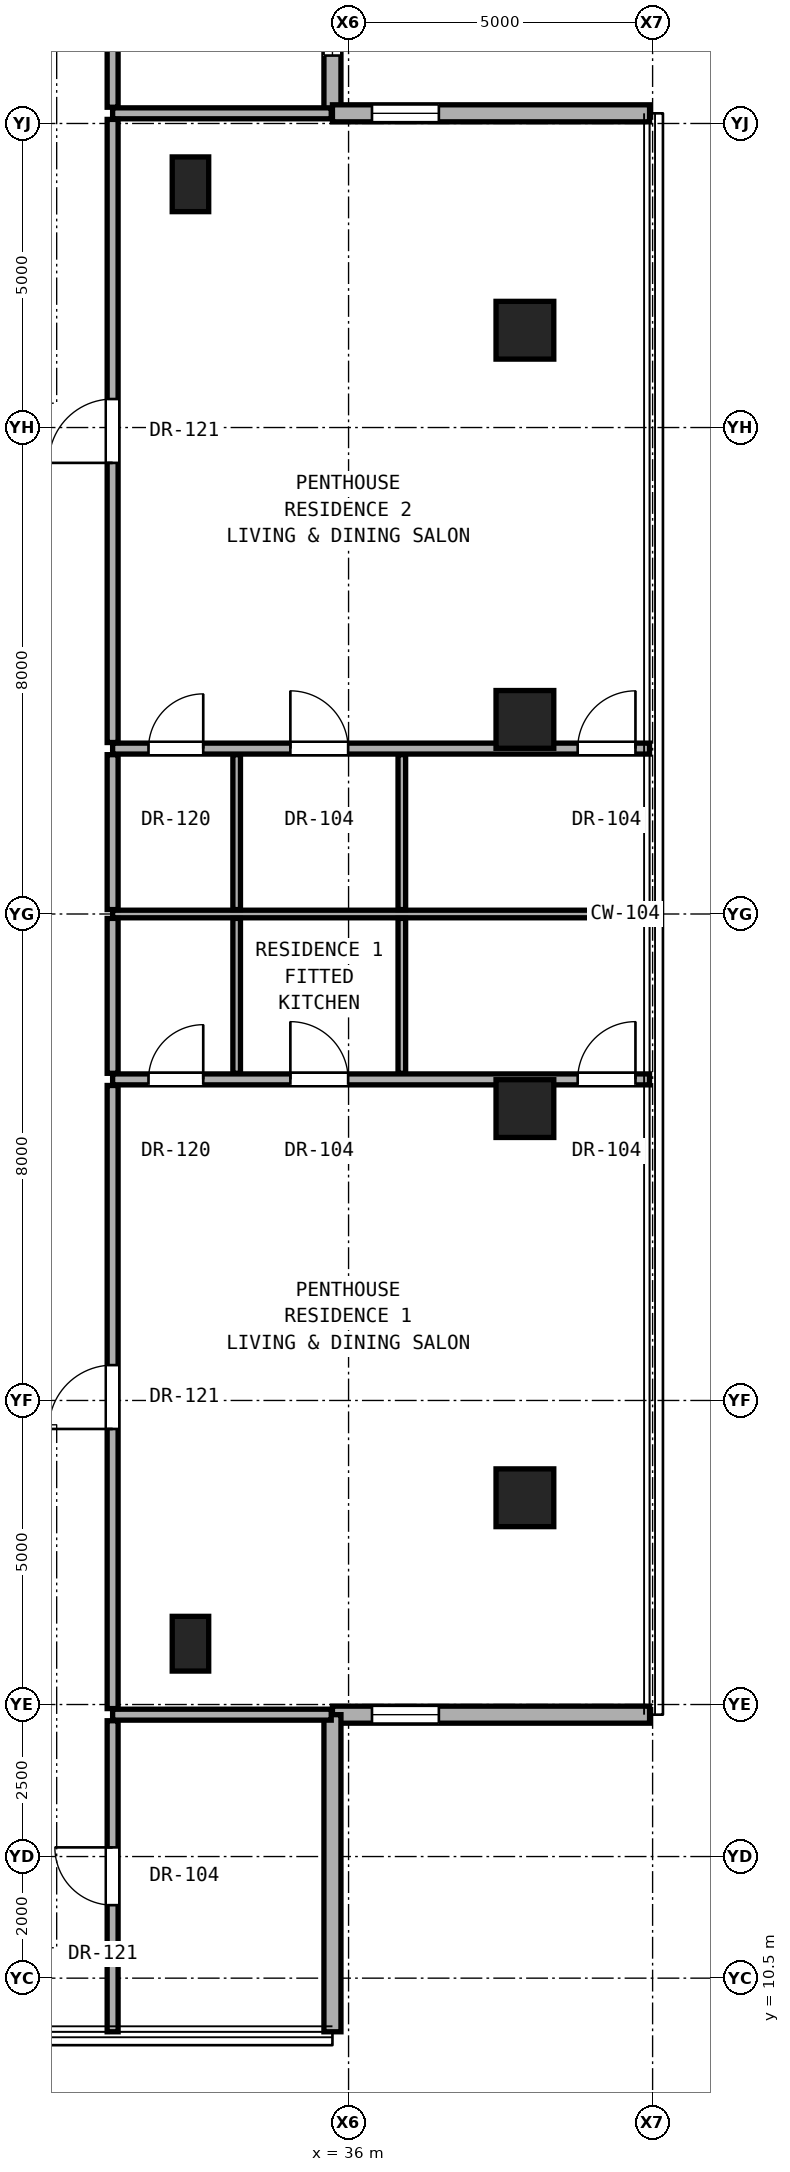
"""IFC4 building model, lengths in metres.
Left out: names, types, materials, properties, quantities, classifications, styles, units other than length and angle.
Written with IfcOpenShell. Run it as: python <this file> out.ifc"""

import sys

from ifc_helpers import new_model, si_unit, direction, frame, frame_2d, origin, origin_2d, place, context, subcontext, project, spatial, rectangle, hollow_rectangle, extrude, element, fill, save


model = new_model("IFC4")
c1 = context("Model", 3, precision=1e-05, world=origin(), true_north=direction((0.0, 1.0)))
c2 = subcontext(c1, "Body", "Model", "MODEL_VIEW")
j1 = project(units=[si_unit("LENGTHUNIT", "METRE"), si_unit("PLANEANGLEUNIT", "RADIAN")], contexts=[c1])
p1 = place(None, origin())
s1 = spatial("IfcSite", under=j1, at=p1, CompositionType="ELEMENT")
p2 = place(p1, origin())
s2 = spatial("IfcBuilding", under=s1, at=p2, CompositionType="ELEMENT")
p3 = place(p2, frame((0.0, 0.0, 196.65)))
s3 = spatial("IfcBuildingStorey", under=s2, at=p3, CompositionType="ELEMENT", Elevation=196.65)
for number, where, z_axis, x_axis in (
    (1, (38.9, 18.4, 0.0), (0.0, 0.0, 1.0), (1.0, 0.0, 0.0)),
    (2, (38.9, 24.8, 0.0), (0.0, 0.0, 1.0), (1.0, 0.0, 0.0)),
    (3, (38.9, 31.2, 0.0), (0.0, 0.0, 1.0), (1.0, 0.0, 0.0)),
    (4, (38.9, 37.6, 0.0), (0.0, 0.0, 1.0), (1.0, 0.0, 0.0)),
):
    element("IfcColumn", number, at=place(p3, frame(where, z_axis=z_axis, x_axis=x_axis)), inside=s3, PredefinedType="COLUMN", context=c2, shape_type="SweptSolid", body=[
        extrude(hollow_rectangle(XDim=0.95, YDim=0.95, WallThickness=0.05, at=origin_2d()), origin(), (0.0, 0.0, 1.0), 3.25),
    ])
for number, where, z_axis, x_axis in (
    (5, (33.4, 16.0, 0.0), (0.0, 0.0, 1.0), (1.0, 0.0, 0.0)),
    (6, (33.4, 40.0, 0.0), (0.0, 0.0, 1.0), (1.0, 0.0, 0.0)),
):
    element("IfcColumn", number, at=place(p3, frame(where, z_axis=z_axis, x_axis=x_axis)), inside=s3, PredefinedType="PILASTER", context=c2, shape_type="SweptSolid", body=[
        extrude(rectangle(XDim=0.6, YDim=0.9, at=origin_2d()), origin(), (0.0, 0.0, 1.0), 3.25),
    ])
p4 = place(p3, frame((35.735, 41.167, 0.0), z_axis=(0.0, 0.0, 1.0), x_axis=(0.0, 1.0, 0.0)))
e7 = element("IfcWall", 7, at=p4, inside=s3, PredefinedType="SOLIDWALL", context=c2, shape_type="SweptSolid", body=[
    extrude(rectangle(XDim=5.215, YDim=0.28, at=frame_2d((2.607, 0.0))), origin(), (0.0, 0.0, 1.0), 3.03),
])
p5 = place(p4, frame((0.95, 0.0, 0.85)))
e8 = element("IfcOpeningElement", 8, at=p5, cuts=e7, PredefinedType="OPENING", context=c2, shape_type="SweptSolid", body=[
    extrude(rectangle(XDim=1.1, YDim=2.0, at=frame_2d((0.55, 1.0))), frame((0.0, 0.15, 0.0), z_axis=(0.0, -1.0, 0.0), x_axis=(1.0, 0.0, 0.0)), (0.0, 0.0, 1.0), 0.3),
])
p6 = place(p3, frame((35.735, 14.833, 0.0), z_axis=(0.0, 0.0, 1.0), x_axis=(1.0, 0.0, 0.0)))
e9 = element("IfcWall", 9, at=p6, inside=s3, PredefinedType="SOLIDWALL", context=c2, shape_type="SweptSolid", body=[
    extrude(rectangle(XDim=5.215, YDim=0.28, at=frame_2d((2.607, 0.0))), origin(), (0.0, 0.0, 1.0), 3.03),
])
p7 = place(p6, frame((0.65, 0.0, 0.85)))
e10 = element("IfcOpeningElement", 10, at=p7, cuts=e9, PredefinedType="OPENING", context=c2, shape_type="SweptSolid", body=[
    extrude(rectangle(XDim=1.1, YDim=2.0, at=frame_2d((0.55, 1.0))), frame((0.0, 0.15, 0.0), z_axis=(0.0, -1.0, 0.0), x_axis=(1.0, 0.0, 0.0)), (0.0, 0.0, 1.0), 0.3),
])
p8 = place(p3, frame((35.735, 9.618, 0.0), z_axis=(0.0, 0.0, 1.0), x_axis=(0.0, 1.0, 0.0)))
e11 = element("IfcWall", 11, at=p8, inside=s3, PredefinedType="SOLIDWALL", context=c2, shape_type="SweptSolid", body=[
    extrude(rectangle(XDim=5.215, YDim=0.28, at=frame_2d((2.607, 0.0))), origin(), (0.0, 0.0, 1.0), 3.03),
])
p9 = place(p3, frame((40.95, 41.167, 0.0), z_axis=(0.0, 0.0, 1.0), x_axis=(-1.0, 0.0, 0.0)))
e12 = element("IfcWall", 12, at=p9, inside=s3, PredefinedType="SOLIDWALL", context=c2, shape_type="SweptSolid", body=[
    extrude(rectangle(XDim=5.215, YDim=0.28, at=frame_2d((2.607, 0.0))), origin(), (0.0, 0.0, 1.0), 3.03),
])
p10 = place(p9, frame((3.465, 0.0, 0.85)))
e13 = element("IfcOpeningElement", 13, at=p10, cuts=e12, PredefinedType="OPENING", context=c2, shape_type="SweptSolid", body=[
    extrude(rectangle(XDim=1.1, YDim=2.0, at=frame_2d((0.55, 1.0))), frame((0.0, 0.15, 0.0), z_axis=(0.0, -1.0, 0.0), x_axis=(1.0, 0.0, 0.0)), (0.0, 0.0, 1.0), 0.3),
])
p11 = place(p3, frame((32.12, 14.833, 0.0), z_axis=(0.0, 0.0, 1.0), x_axis=(1.0, 0.0, 0.0)))
e14 = element("IfcWall", 14, at=p11, inside=s3, PredefinedType="PARTITIONING", context=c2, shape_type="SweptSolid", body=[
    extrude(rectangle(XDim=3.595, YDim=0.18, at=frame_2d((1.797, 0.0))), origin(), (0.0, 0.0, 1.0), 3.05),
])
p12 = place(p3, frame((32.12, 25.28, 0.0), z_axis=(0.0, 0.0, 1.0), x_axis=(1.0, 0.0, 0.0)))
e15 = element("IfcWall", 15, at=p12, inside=s3, PredefinedType="PARTITIONING", context=c2, shape_type="SweptSolid", body=[
    extrude(rectangle(XDim=8.83, YDim=0.18, at=frame_2d((4.415, 0.0))), origin(), (0.0, 0.0, 1.0), 2.269),
])
p13 = place(p12, frame((7.648, 0.0, 0.0)))
e16 = element("IfcOpeningElement", 16, at=p13, cuts=e15, PredefinedType="OPENING", context=c2, shape_type="SweptSolid", body=[
    extrude(rectangle(XDim=0.95, YDim=2.15, at=frame_2d((0.475, 1.075))), frame((0.0, 0.1, 0.0), z_axis=(0.0, -1.0, 0.0), x_axis=(1.0, 0.0, 0.0)), (0.0, 0.0, 1.0), 0.2),
])
p14 = place(p12, frame((2.923, 0.0, 0.0)))
e17 = element("IfcOpeningElement", 17, at=p14, cuts=e15, PredefinedType="OPENING", context=c2, shape_type="SweptSolid", body=[
    extrude(rectangle(XDim=0.95, YDim=2.15, at=frame_2d((0.475, 1.075))), frame((0.0, 0.1, 0.0), z_axis=(0.0, -1.0, 0.0), x_axis=(1.0, 0.0, 0.0)), (0.0, 0.0, 1.0), 0.2),
])
p15 = place(p12, frame((0.59, 0.0, 0.0)))
e18 = element("IfcOpeningElement", 18, at=p15, cuts=e15, PredefinedType="OPENING", context=c2, shape_type="SweptSolid", body=[
    extrude(rectangle(XDim=0.9, YDim=2.1, at=frame_2d((0.45, 1.05))), frame((0.0, 0.1, 0.0), z_axis=(0.0, -1.0, 0.0), x_axis=(1.0, 0.0, 0.0)), (0.0, 0.0, 1.0), 0.2),
])
p16 = place(p3, frame((32.12, 28.0, 0.0), z_axis=(0.0, 0.0, 1.0), x_axis=(1.0, 0.0, 0.0)))
e19 = element("IfcWall", 19, at=p16, inside=s3, PredefinedType="PARTITIONING", context=c2, shape_type="SweptSolid", body=[
    extrude(rectangle(XDim=8.83, YDim=0.125, at=frame_2d((4.415, 0.0))), origin(), (0.0, 0.0, 1.0), 2.269),
])
p17 = place(p3, frame((32.12, 30.72, 0.0), z_axis=(0.0, 0.0, 1.0), x_axis=(1.0, 0.0, 0.0)))
e20 = element("IfcWall", 20, at=p17, inside=s3, PredefinedType="PARTITIONING", context=c2, shape_type="SweptSolid", body=[
    extrude(rectangle(XDim=8.83, YDim=0.18, at=frame_2d((4.415, 0.0))), origin(), (0.0, 0.0, 1.0), 2.269),
])
p18 = place(p17, frame((7.648, 0.0, 0.0)))
e21 = element("IfcOpeningElement", 21, at=p18, cuts=e20, PredefinedType="OPENING", context=c2, shape_type="SweptSolid", body=[
    extrude(rectangle(XDim=0.95, YDim=2.15, at=frame_2d((0.475, 1.075))), frame((0.0, 0.1, 0.0), z_axis=(0.0, -1.0, 0.0), x_axis=(1.0, 0.0, 0.0)), (0.0, 0.0, 1.0), 0.2),
])
p19 = place(p17, frame((2.923, 0.0, 0.0)))
e22 = element("IfcOpeningElement", 22, at=p19, cuts=e20, PredefinedType="OPENING", context=c2, shape_type="SweptSolid", body=[
    extrude(rectangle(XDim=0.95, YDim=2.15, at=frame_2d((0.475, 1.075))), frame((0.0, 0.1, 0.0), z_axis=(0.0, -1.0, 0.0), x_axis=(1.0, 0.0, 0.0)), (0.0, 0.0, 1.0), 0.2),
])
p20 = place(p17, frame((0.59, 0.0, 0.0)))
e23 = element("IfcOpeningElement", 23, at=p20, cuts=e20, PredefinedType="OPENING", context=c2, shape_type="SweptSolid", body=[
    extrude(rectangle(XDim=0.9, YDim=2.1, at=frame_2d((0.45, 1.05))), frame((0.0, 0.1, 0.0), z_axis=(0.0, -1.0, 0.0), x_axis=(1.0, 0.0, 0.0)), (0.0, 0.0, 1.0), 0.2),
])
p21 = place(p3, frame((32.12, 41.167, 0.0), z_axis=(0.0, 0.0, 1.0), x_axis=(1.0, 0.0, 0.0)))
e24 = element("IfcWall", 24, at=p21, inside=s3, PredefinedType="PARTITIONING", context=c2, shape_type="SweptSolid", body=[
    extrude(rectangle(XDim=3.595, YDim=0.18, at=frame_2d((1.797, 0.0))), origin(), (0.0, 0.0, 1.0), 3.05),
])
p22 = place(p3, frame((32.12, 9.618, 0.0), z_axis=(0.0, 0.0, 1.0), x_axis=(0.0, 1.0, 0.0)))
e25 = element("IfcWall", 25, at=p22, inside=s3, PredefinedType="PARTITIONING", context=c2, shape_type="SweptSolid", body=[
    extrude(rectangle(XDim=5.115, YDim=0.18, at=frame_2d((2.558, 0.0))), origin(), (0.0, 0.0, 1.0), 3.05),
])
p23 = place(p22, frame((2.083, 0.0, 0.0)))
e26 = element("IfcOpeningElement", 26, at=p23, cuts=e25, PredefinedType="OPENING", context=c2, shape_type="SweptSolid", body=[
    extrude(rectangle(XDim=0.95, YDim=2.15, at=frame_2d((0.475, 1.075))), frame((0.0, 0.1, 0.0), z_axis=(0.0, -1.0, 0.0), x_axis=(1.0, 0.0, 0.0)), (0.0, 0.0, 1.0), 0.2),
])
p24 = place(p3, frame((32.12, 14.933, 0.0), z_axis=(0.0, 0.0, 1.0), x_axis=(0.0, 1.0, 0.0)))
e27 = element("IfcWall", 27, at=p24, inside=s3, PredefinedType="PARTITIONING", context=c2, shape_type="SweptSolid", body=[
    extrude(rectangle(XDim=10.247, YDim=0.18, at=frame_2d((5.124, 0.0))), origin(), (0.0, 0.0, 1.0), 2.346),
])
p25 = place(p24, frame((4.598, 0.0, 0.0)))
e28 = element("IfcOpeningElement", 28, at=p25, cuts=e27, PredefinedType="OPENING", context=c2, shape_type="SweptSolid", body=[
    extrude(rectangle(XDim=1.05, YDim=2.2, at=frame_2d((0.525, 1.1))), frame((0.0, 0.1, 0.0), z_axis=(0.0, -1.0, 0.0), x_axis=(1.0, 0.0, 0.0)), (0.0, 0.0, 1.0), 0.2),
])
for number, where, z_axis, x_axis in (
    (29, (32.12, 25.38, 0.0), (0.0, 0.0, 1.0), (0.0, 1.0, 0.0)),
    (30, (32.12, 28.073, 0.0), (0.0, 0.0, 1.0), (0.0, 1.0, 0.0)),
):
    element("IfcWall", number, at=place(p3, frame(where, z_axis=z_axis, x_axis=x_axis)), inside=s3, PredefinedType="PARTITIONING", context=c2, shape_type="SweptSolid", body=[
        extrude(rectangle(XDim=2.548, YDim=0.18, at=frame_2d((1.274, 0.0))), origin(), (0.0, 0.0, 1.0), 3.05),
    ])
p26 = place(p3, frame((32.12, 30.82, 0.0), z_axis=(0.0, 0.0, 1.0), x_axis=(0.0, 1.0, 0.0)))
e31 = element("IfcWall", 31, at=p26, inside=s3, PredefinedType="PARTITIONING", context=c2, shape_type="SweptSolid", body=[
    extrude(rectangle(XDim=10.247, YDim=0.18, at=frame_2d((5.124, 0.0))), origin(), (0.0, 0.0, 1.0), 2.346),
])
p27 = place(p26, frame((4.598, 0.0, 0.0)))
e32 = element("IfcOpeningElement", 32, at=p27, cuts=e31, PredefinedType="OPENING", context=c2, shape_type="SweptSolid", body=[
    extrude(rectangle(XDim=1.05, YDim=2.2, at=frame_2d((0.525, 1.1))), frame((0.0, 0.1, 0.0), z_axis=(0.0, -1.0, 0.0), x_axis=(1.0, 0.0, 0.0)), (0.0, 0.0, 1.0), 0.2),
])
p28 = place(p3, frame((32.12, 41.267, 0.0), z_axis=(0.0, 0.0, 1.0), x_axis=(0.0, 1.0, 0.0)))
e33 = element("IfcWall", 33, at=p28, inside=s3, PredefinedType="PARTITIONING", context=c2, shape_type="SweptSolid", body=[
    extrude(rectangle(XDim=5.115, YDim=0.18, at=frame_2d((2.558, 0.0))), origin(), (0.0, 0.0, 1.0), 3.05),
])
p29 = place(p28, frame((2.083, 0.0, 0.0)))
e34 = element("IfcOpeningElement", 34, at=p29, cuts=e33, PredefinedType="OPENING", context=c2, shape_type="SweptSolid", body=[
    extrude(rectangle(XDim=0.95, YDim=2.15, at=frame_2d((0.475, 1.075))), frame((0.0, 0.1, 0.0), z_axis=(0.0, -1.0, 0.0), x_axis=(1.0, 0.0, 0.0)), (0.0, 0.0, 1.0), 0.2),
])
for number, where, z_axis, x_axis in (
    (35, (34.16, 25.38, 0.0), (0.0, 0.0, 1.0), (0.0, 1.0, 0.0)),
    (36, (34.16, 28.073, 0.0), (0.0, 0.0, 1.0), (0.0, 1.0, 0.0)),
    (37, (36.876, 25.38, 0.0), (0.0, 0.0, 1.0), (0.0, 1.0, 0.0)),
    (38, (36.876, 28.073, 0.0), (0.0, 0.0, 1.0), (0.0, 1.0, 0.0)),
):
    element("IfcWall", number, at=place(p3, frame(where, z_axis=z_axis, x_axis=x_axis)), inside=s3, PredefinedType="PARTITIONING", context=c2, shape_type="SweptSolid", body=[
        extrude(rectangle(XDim=2.548, YDim=0.125, at=frame_2d((1.274, 0.0))), origin(), (0.0, 0.0, 1.0), 3.05),
    ])
p30 = place(p5, origin())
e39 = element("IfcWindow", 39, at=p30, inside=s3, PartitioningType="SINGLE_PANEL", PredefinedType="WINDOW", context=c2, shape_type="SweptSolid", body=[
    extrude(rectangle(XDim=1.1, YDim=2.0, at=frame_2d((0.55, 1.0))), frame((0.0, 0.03, 0.0), z_axis=(0.0, -1.0, 0.0), x_axis=(1.0, 0.0, 0.0)), (0.0, 0.0, 1.0), 0.06),
])
fill(e8, e39)
p31 = place(p7, origin())
e40 = element("IfcWindow", 40, at=p31, inside=s3, PartitioningType="SINGLE_PANEL", PredefinedType="WINDOW", context=c2, shape_type="SweptSolid", body=[
    extrude(rectangle(XDim=1.1, YDim=2.0, at=frame_2d((0.55, 1.0))), frame((0.0, 0.03, 0.0), z_axis=(0.0, -1.0, 0.0), x_axis=(1.0, 0.0, 0.0)), (0.0, 0.0, 1.0), 0.06),
])
fill(e10, e40)
p32 = place(p10, origin())
e41 = element("IfcWindow", 41, at=p32, inside=s3, PartitioningType="SINGLE_PANEL", PredefinedType="WINDOW", context=c2, shape_type="SweptSolid", body=[
    extrude(rectangle(XDim=1.1, YDim=2.0, at=frame_2d((0.55, 1.0))), frame((0.0, 0.03, 0.0), z_axis=(0.0, -1.0, 0.0), x_axis=(1.0, 0.0, 0.0)), (0.0, 0.0, 1.0), 0.06),
])
fill(e13, e41)
p33 = place(p25, origin())
e42 = element("IfcDoor", 42, at=p33, inside=s3, OperationType="SINGLE_SWING_LEFT", PredefinedType="DOOR", context=c2, shape_type="SweptSolid", body=[
    extrude(rectangle(XDim=1.05, YDim=2.2, at=frame_2d((0.525, 1.1))), frame((0.0, 0.025, 0.0), z_axis=(0.0, -1.0, 0.0), x_axis=(1.0, 0.0, 0.0)), (0.0, 0.0, 1.0), 0.05),
])
fill(e28, e42)
p34 = place(p13, origin())
e43 = element("IfcDoor", 43, at=p34, inside=s3, OperationType="SINGLE_SWING_RIGHT", PredefinedType="DOOR", context=c2, shape_type="SweptSolid", body=[
    extrude(rectangle(XDim=0.95, YDim=2.15, at=frame_2d((0.475, 1.075))), frame((0.0, 0.025, 0.0), z_axis=(0.0, -1.0, 0.0), x_axis=(1.0, 0.0, 0.0)), (0.0, 0.0, 1.0), 0.05),
])
fill(e16, e43)
p35 = place(p14, origin())
e44 = element("IfcDoor", 44, at=p35, inside=s3, OperationType="SINGLE_SWING_LEFT", PredefinedType="DOOR", context=c2, shape_type="SweptSolid", body=[
    extrude(rectangle(XDim=0.95, YDim=2.15, at=frame_2d((0.475, 1.075))), frame((0.0, 0.025, 0.0), z_axis=(0.0, -1.0, 0.0), x_axis=(1.0, 0.0, 0.0)), (0.0, 0.0, 1.0), 0.05),
])
fill(e17, e44)
p36 = place(p15, origin())
e45 = element("IfcDoor", 45, at=p36, inside=s3, OperationType="SINGLE_SWING_RIGHT", PredefinedType="DOOR", context=c2, shape_type="SweptSolid", body=[
    extrude(rectangle(XDim=0.9, YDim=2.1, at=frame_2d((0.45, 1.05))), frame((0.0, 0.025, 0.0), z_axis=(0.0, -1.0, 0.0), x_axis=(1.0, 0.0, 0.0)), (0.0, 0.0, 1.0), 0.05),
])
fill(e18, e45)
p37 = place(p27, origin())
e46 = element("IfcDoor", 46, at=p37, inside=s3, OperationType="SINGLE_SWING_LEFT", PredefinedType="DOOR", context=c2, shape_type="SweptSolid", body=[
    extrude(rectangle(XDim=1.05, YDim=2.2, at=frame_2d((0.525, 1.1))), frame((0.0, 0.025, 0.0), z_axis=(0.0, -1.0, 0.0), x_axis=(1.0, 0.0, 0.0)), (0.0, 0.0, 1.0), 0.05),
])
fill(e32, e46)
p38 = place(p18, origin())
e47 = element("IfcDoor", 47, at=p38, inside=s3, OperationType="SINGLE_SWING_RIGHT", PredefinedType="DOOR", context=c2, shape_type="SweptSolid", body=[
    extrude(rectangle(XDim=0.95, YDim=2.15, at=frame_2d((0.475, 1.075))), frame((0.0, 0.025, 0.0), z_axis=(0.0, -1.0, 0.0), x_axis=(1.0, 0.0, 0.0)), (0.0, 0.0, 1.0), 0.05),
])
fill(e21, e47)
p39 = place(p19, origin())
e48 = element("IfcDoor", 48, at=p39, inside=s3, OperationType="SINGLE_SWING_LEFT", PredefinedType="DOOR", context=c2, shape_type="SweptSolid", body=[
    extrude(rectangle(XDim=0.95, YDim=2.15, at=frame_2d((0.475, 1.075))), frame((0.0, 0.025, 0.0), z_axis=(0.0, -1.0, 0.0), x_axis=(1.0, 0.0, 0.0)), (0.0, 0.0, 1.0), 0.05),
])
fill(e22, e48)
p40 = place(p20, origin())
e49 = element("IfcDoor", 49, at=p40, inside=s3, OperationType="SINGLE_SWING_RIGHT", PredefinedType="DOOR", context=c2, shape_type="SweptSolid", body=[
    extrude(rectangle(XDim=0.9, YDim=2.1, at=frame_2d((0.45, 1.05))), frame((0.0, 0.025, 0.0), z_axis=(0.0, -1.0, 0.0), x_axis=(1.0, 0.0, 0.0)), (0.0, 0.0, 1.0), 0.05),
])
fill(e23, e49)
p41 = place(p23, origin())
e50 = element("IfcDoor", 50, at=p41, inside=s3, OperationType="SINGLE_SWING_RIGHT", PredefinedType="DOOR", context=c2, shape_type="SweptSolid", body=[
    extrude(rectangle(XDim=0.95, YDim=2.15, at=frame_2d((0.475, 1.075))), frame((0.0, 0.025, 0.0), z_axis=(0.0, -1.0, 0.0), x_axis=(1.0, 0.0, 0.0)), (0.0, 0.0, 1.0), 0.05),
])
fill(e26, e50)
save(model, sys.argv[1])
